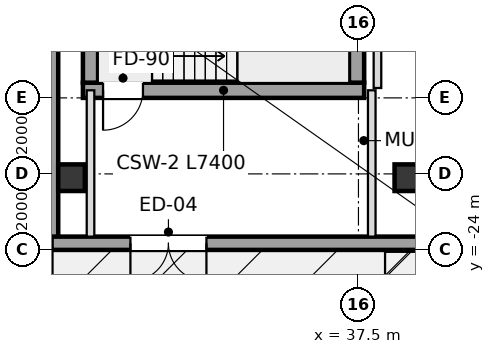
"""IFC4 building model, lengths in metres.
Left out: names, types, materials, properties, quantities, classifications, styles, units other than length and angle.
Written with IfcOpenShell. Run it as: python <this file> out.ifc"""

import sys

from ifc_helpers import new_model, si_unit, direction, frame, frame_2d, origin, origin_2d, place, context, subcontext, project, spatial, rectangle, extrude, element, fill, save


model = new_model("IFC4")
c1 = context("Model", 3, precision=1e-05, world=origin(), true_north=direction((0.0, 1.0)))
c2 = subcontext(c1, "Body", "Model", "MODEL_VIEW")
j1 = project(units=[si_unit("LENGTHUNIT", "METRE"), si_unit("PLANEANGLEUNIT", "RADIAN")], contexts=[c1])
p1 = place(None, origin())
s1 = spatial("IfcSite", under=j1, at=p1, CompositionType="ELEMENT")
p2 = place(p1, origin())
s2 = spatial("IfcBuilding", under=s1, at=p2, CompositionType="ELEMENT")
p3 = place(p2, origin())
s3 = spatial("IfcBuildingStorey", under=s2, at=p3, CompositionType="ELEMENT", Elevation=0.0)
for number, where, z_axis, x_axis in (
    (1, (29.95, -22.1, 0.0), (0.0, 0.0, 1.0), (1.0, 0.0, 0.0)),
    (2, (38.8, -22.1, 0.0), (0.0, 0.0, 1.0), (1.0, 0.0, 0.0)),
):
    element("IfcColumn", number, at=place(p3, frame(where, z_axis=z_axis, x_axis=x_axis)), inside=s3, PredefinedType="COLUMN", context=c2, shape_type="SweptSolid", body=[
        extrude(rectangle(XDim=0.7, YDim=0.7, at=origin_2d()), origin(), (0.0, 0.0, 1.0), 6.0),
    ])
p4 = place(p3, frame((29.425, 23.825, 0.0), z_axis=(0.0, 0.0, 1.0), x_axis=(0.0, -1.0, 0.0)))
e3 = element("IfcWall", 3, at=p4, inside=s3, PredefinedType="SOLIDWALL", context=c2, shape_type="SweptSolid", body=[
    extrude(rectangle(XDim=47.65, YDim=0.35, at=frame_2d((23.825, 0.0))), origin(), (0.0, 0.0, 1.0), 5.68),
])
p5 = place(p4, frame((22.8, 0.0, 0.0)))
e4 = element("IfcOpeningElement", 4, at=p5, cuts=e3, PredefinedType="OPENING", context=c2, shape_type="SweptSolid", body=[
    extrude(rectangle(XDim=2.2, YDim=2.5, at=frame_2d((1.1, 1.25))), frame((0.0, 0.185, 0.0), z_axis=(0.0, -1.0, 0.0), x_axis=(1.0, 0.0, 0.0)), (0.0, 0.0, 1.0), 0.37),
])
p6 = place(p3, frame((57.325, -23.825, 0.0), z_axis=(0.0, 0.0, 1.0), x_axis=(-1.0, 0.0, 0.0)))
e5 = element("IfcWall", 5, at=p6, inside=s3, PredefinedType="SOLIDWALL", context=c2, shape_type="SweptSolid", body=[
    extrude(rectangle(XDim=27.9, YDim=0.35, at=frame_2d((13.95, 0.0))), origin(), (0.0, 0.0, 1.0), 5.68),
])
p7 = place(p6, frame((23.825, 0.0, 0.0)))
e6 = element("IfcOpeningElement", 6, at=p7, cuts=e5, PredefinedType="OPENING", context=c2, shape_type="SweptSolid", body=[
    extrude(rectangle(XDim=2.0, YDim=2.2, at=frame_2d((1.0, 1.1))), frame((0.0, 0.185, 0.0), z_axis=(0.0, -1.0, 0.0), x_axis=(1.0, 0.0, 0.0)), (0.0, 0.0, 1.0), 0.37),
])
p8 = place(p3, frame((37.65, -19.8, 0.0), z_axis=(0.0, 0.0, 1.0), x_axis=(-1.0, 0.0, 0.0)))
e7 = element("IfcWall", 7, at=p8, inside=s3, PredefinedType="SHEAR", context=c2, shape_type="SweptSolid", body=[
    extrude(rectangle(XDim=7.4, YDim=0.4, at=frame_2d((3.7, 0.0))), origin(), (0.0, 0.0, 1.0), 5.68),
])
p9 = place(p8, frame((5.82, 0.0, 0.0)))
e8 = element("IfcOpeningElement", 8, at=p9, cuts=e7, PredefinedType="OPENING", context=c2, shape_type="SweptSolid", body=[
    extrude(rectangle(XDim=1.05, YDim=2.15, at=frame_2d((0.525, 1.075))), frame((0.0, 0.21, 0.0), z_axis=(0.0, -1.0, 0.0), x_axis=(1.0, 0.0, 0.0)), (0.0, 0.0, 1.0), 0.42),
])
for number, where, z_axis, x_axis in (
    (9, (37.45, -19.6, 0.0), (0.0, 0.0, 1.0), (0.0, 1.0, 0.0)),
    (10, (30.45, -19.6, 0.0), (0.0, 0.0, 1.0), (0.0, 1.0, 0.0)),
):
    element("IfcWall", number, at=place(p3, frame(where, z_axis=z_axis, x_axis=x_axis)), inside=s3, PredefinedType="SHEAR", context=c2, shape_type="SweptSolid", body=[
        extrude(rectangle(XDim=3.0, YDim=0.4, at=frame_2d((1.5, 0.0))), origin(), (0.0, 0.0, 1.0), 5.68),
    ])
for number, where, z_axis, x_axis in (
    (11, (30.45, -23.65, 0.0), (0.0, 0.0, 1.0), (0.0, 1.0, 0.0)),
    (12, (37.85, -23.65, 0.0), (0.0, 0.0, 1.0), (0.0, 1.0, 0.0)),
):
    element("IfcWall", number, at=place(p3, frame(where, z_axis=z_axis, x_axis=x_axis)), inside=s3, PredefinedType="SOLIDWALL", context=c2, shape_type="SweptSolid", body=[
        extrude(rectangle(XDim=3.85, YDim=0.2, at=frame_2d((1.925, 0.0))), origin(), (0.0, 0.0, 1.0), 4.897),
    ])
p10 = place(p3, frame((38.0, -19.74, 0.0), z_axis=(0.0, 0.0, 1.0), x_axis=(0.0, 1.0, 0.0)))
e13 = element("IfcWall", 13, at=p10, inside=s3, PredefinedType="SOLIDWALL", context=c2, shape_type="SweptSolid", body=[
    extrude(rectangle(XDim=4.54, YDim=0.2, at=frame_2d((2.27, 0.0))), origin(), (0.0, 0.0, 1.0), 5.68),
])
p11 = place(p7, origin())
e14 = element("IfcDoor", 14, at=p11, inside=s3, OperationType="DOUBLE_DOOR_SINGLE_SWING", PredefinedType="DOOR", context=c2, shape_type="SweptSolid", body=[
    extrude(rectangle(XDim=2.0, YDim=2.2, at=frame_2d((1.0, 1.1))), frame((0.0, 0.025, 0.0), z_axis=(0.0, -1.0, 0.0), x_axis=(1.0, 0.0, 0.0)), (0.0, 0.0, 1.0), 0.05),
])
fill(e6, e14)
p12 = place(p9, origin())
e15 = element("IfcDoor", 15, at=p12, inside=s3, OperationType="SINGLE_SWING_RIGHT", PredefinedType="DOOR", context=c2, shape_type="SweptSolid", body=[
    extrude(rectangle(XDim=1.05, YDim=2.15, at=frame_2d((0.525, 1.075))), frame((0.0, 0.025, 0.0), z_axis=(0.0, -1.0, 0.0), x_axis=(1.0, 0.0, 0.0)), (0.0, 0.0, 1.0), 0.05),
])
fill(e8, e15)
save(model, sys.argv[1])
